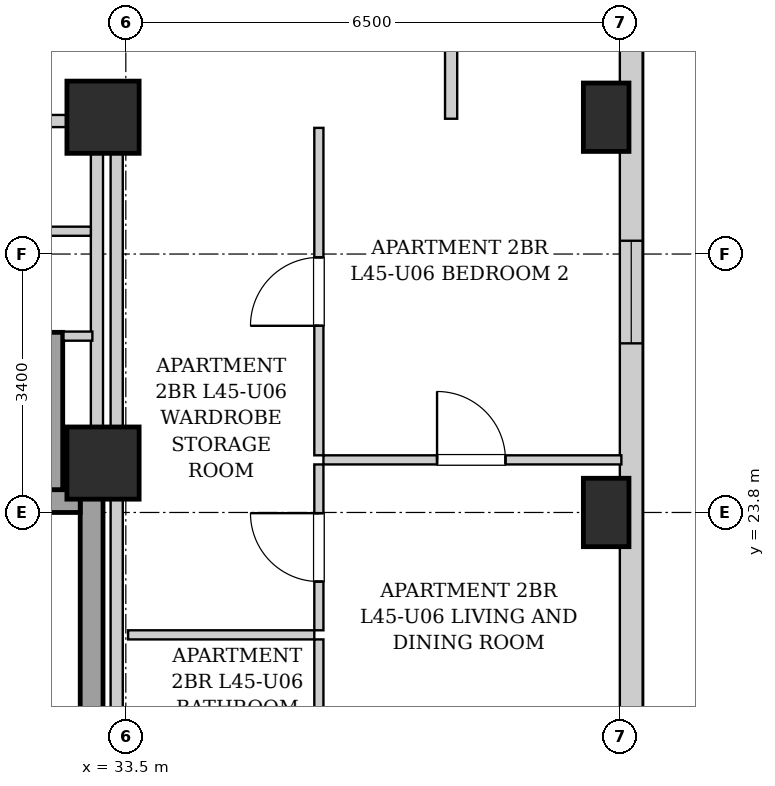
"""IFC4 building model, lengths in metres.
Left out: names, types, materials, properties, quantities, classifications, styles, units other than length and angle.
Written with IfcOpenShell. Run it as: python <this file> out.ifc"""

import sys

from ifc_helpers import new_model, si_unit, direction, frame, frame_2d, origin, origin_2d, place, context, subcontext, project, spatial, rectangle, extrude, element, fill, save


model = new_model("IFC4")
c1 = context("Model", 3, precision=1e-05, world=origin(), true_north=direction((0.0, 1.0)))
c2 = subcontext(c1, "Body", "Model", "MODEL_VIEW")
j1 = project(units=[si_unit("LENGTHUNIT", "METRE"), si_unit("PLANEANGLEUNIT", "RADIAN")], contexts=[c1])
p1 = place(None, origin())
s1 = spatial("IfcSite", under=j1, at=p1, CompositionType="ELEMENT")
p2 = place(p1, origin())
s2 = spatial("IfcBuilding", under=s1, at=p2, CompositionType="ELEMENT")
p3 = place(p2, frame((0.0, 0.0, 156.9)))
s3 = spatial("IfcBuildingStorey", under=s2, at=p3, CompositionType="ELEMENT", Elevation=156.9)
for number, where, z_axis, x_axis in (
    (1, (39.82, 23.8, 0.0), (0.0, 0.0, 1.0), (1.0, 0.0, 0.0)),
    (2, (39.82, 29.0, 0.0), (0.0, 0.0, 1.0), (1.0, 0.0, 0.0)),
):
    element("IfcColumn", number, at=place(p3, frame(where, z_axis=z_axis, x_axis=x_axis)), inside=s3, PredefinedType="COLUMN", context=c2, shape_type="SweptSolid", body=[
        extrude(rectangle(XDim=0.6, YDim=0.9, at=origin_2d()), origin(), (0.0, 0.0, 1.0), 3.25),
    ])
for number, where, z_axis, x_axis in (
    (3, (33.2, 29.0, 0.0), (0.0, 0.0, 1.0), (1.0, 0.0, 0.0)),
    (4, (33.2, 24.45, 0.0), (0.0, 0.0, 1.0), (1.0, 0.0, 0.0)),
):
    element("IfcColumn", number, at=place(p3, frame(where, z_axis=z_axis, x_axis=x_axis)), inside=s3, PredefinedType="COLUMN", context=c2, shape_type="SweptSolid", body=[
        extrude(rectangle(XDim=0.95, YDim=0.95, at=origin_2d()), origin(), (0.0, 0.0, 1.0), 3.25),
    ])
p4 = place(p3, frame((40.15, 40.8, 0.0), z_axis=(0.0, 0.0, 1.0), x_axis=(0.0, -1.0, 0.0)))
e5 = element("IfcWall", 5, at=p4, inside=s3, PredefinedType="SOLIDWALL", context=c2, shape_type="SweptSolid", body=[
    extrude(rectangle(XDim=34.5, YDim=0.3, at=frame_2d((17.25, 0.0))), origin(), (0.0, 0.0, 1.0), 2.99),
])
p5 = place(p4, frame((31.575, 0.0, 0.55)))
e6 = element("IfcOpeningElement", 6, at=p5, cuts=e5, PredefinedType="OPENING", context=c2, shape_type="SweptSolid", body=[
    extrude(rectangle(XDim=1.35, YDim=1.2, at=frame_2d((0.675, 0.6))), frame((0.0, 0.16, 0.0), z_axis=(0.0, -1.0, 0.0), x_axis=(1.0, 0.0, 0.0)), (0.0, 0.0, 1.0), 0.32),
])
p6 = place(p4, frame((3.075, 0.0, 0.55)))
e7 = element("IfcOpeningElement", 7, at=p6, cuts=e5, PredefinedType="OPENING", context=c2, shape_type="SweptSolid", body=[
    extrude(rectangle(XDim=1.35, YDim=1.2, at=frame_2d((0.675, 0.6))), frame((0.0, 0.16, 0.0), z_axis=(0.0, -1.0, 0.0), x_axis=(1.0, 0.0, 0.0)), (0.0, 0.0, 1.0), 0.32),
])
p7 = place(p4, frame((1.085, 0.0, 0.55)))
e8 = element("IfcOpeningElement", 8, at=p7, cuts=e5, PredefinedType="OPENING", context=c2, shape_type="SweptSolid", body=[
    extrude(rectangle(XDim=1.35, YDim=1.2, at=frame_2d((0.675, 0.6))), frame((0.0, 0.16, 0.0), z_axis=(0.0, -1.0, 0.0), x_axis=(1.0, 0.0, 0.0)), (0.0, 0.0, 1.0), 0.32),
])
p8 = place(p4, frame((22.8, 0.0, 0.55)))
e9 = element("IfcOpeningElement", 9, at=p8, cuts=e5, PredefinedType="OPENING", context=c2, shape_type="SweptSolid", body=[
    extrude(rectangle(XDim=1.35, YDim=1.2, at=frame_2d((0.675, 0.6))), frame((0.0, 0.16, 0.0), z_axis=(0.0, -1.0, 0.0), x_axis=(1.0, 0.0, 0.0)), (0.0, 0.0, 1.0), 0.32),
])
p9 = place(p4, frame((13.425, 0.0, 0.55)))
e10 = element("IfcOpeningElement", 10, at=p9, cuts=e5, PredefinedType="OPENING", context=c2, shape_type="SweptSolid", body=[
    extrude(rectangle(XDim=1.35, YDim=1.2, at=frame_2d((0.675, 0.6))), frame((0.0, 0.16, 0.0), z_axis=(0.0, -1.0, 0.0), x_axis=(1.0, 0.0, 0.0)), (0.0, 0.0, 1.0), 0.32),
])
p10 = place(p3, frame((33.05, 15.1, 0.0), z_axis=(0.0, 0.0, 1.0), x_axis=(0.0, 1.0, 0.0)))
e11 = element("IfcWall", 11, at=p10, inside=s3, PredefinedType="SHEAR", context=c2, shape_type="SweptSolid", body=[
    extrude(rectangle(XDim=9.0, YDim=0.3, at=frame_2d((4.5, 0.0))), origin(), (0.0, 0.0, 1.0), 2.99),
])
p11 = place(p3, frame((30.05, 23.95, 0.0), z_axis=(0.0, 0.0, 1.0), x_axis=(1.0, 0.0, 0.0)))
e12 = element("IfcWall", 12, at=p11, inside=s3, PredefinedType="SHEAR", context=c2, shape_type="SweptSolid", body=[
    extrude(rectangle(XDim=2.85, YDim=0.3, at=frame_2d((1.425, 0.0))), origin(), (0.0, 0.0, 1.0), 2.99),
])
p12 = place(p3, frame((32.56, 24.1, 0.0), z_axis=(0.0, 0.0, 1.0), x_axis=(0.0, 1.0, 0.0)))
e13 = element("IfcWall", 13, at=p12, inside=s3, PredefinedType="SHEAR", context=c2, shape_type="SweptSolid", body=[
    extrude(rectangle(XDim=2.07, YDim=0.22, at=frame_2d((1.035, 0.0))), origin(), (0.0, 0.0, 1.0), 2.99),
])
p13 = place(p3, frame((33.12, 24.12, 0.0), z_axis=(0.0, 0.0, 1.0), x_axis=(0.0, 1.0, 0.0)))
e14 = element("IfcWall", 14, at=p13, inside=s3, PredefinedType="PARTITIONING", context=c2, shape_type="SweptSolid", body=[
    extrude(rectangle(XDim=4.76, YDim=0.16, at=frame_2d((2.38, 0.0))), origin(), (0.0, 0.0, 1.0), 2.325),
])
p14 = place(p3, frame((32.68, 26.12, 0.0), z_axis=(0.0, 0.0, 1.0), x_axis=(1.0, 0.0, 0.0)))
e15 = element("IfcWall", 15, at=p14, inside=s3, PredefinedType="PARTITIONING", context=c2, shape_type="SweptSolid", body=[
    extrude(rectangle(XDim=0.38, YDim=0.12, at=frame_2d((0.19, 0.0))), origin(), (0.0, 0.0, 1.0), 2.99),
])
p15 = place(p3, frame((30.12, 27.5, 0.0), z_axis=(0.0, 0.0, 1.0), x_axis=(1.0, 0.0, 0.0)))
e16 = element("IfcWall", 16, at=p15, inside=s3, PredefinedType="PARTITIONING", context=c2, shape_type="SweptSolid", body=[
    extrude(rectangle(XDim=2.92, YDim=0.12, at=frame_2d((1.46, 0.0))), origin(), (0.0, 0.0, 1.0), 2.99),
])
p16 = place(p15, frame((0.97, 0.0, 0.0)))
e17 = element("IfcOpeningElement", 17, at=p16, cuts=e16, PredefinedType="OPENING", context=c2, shape_type="SweptSolid", body=[
    extrude(rectangle(XDim=0.86, YDim=2.05, at=frame_2d((0.43, 1.025))), frame((0.0, 0.07, 0.0), z_axis=(0.0, -1.0, 0.0), x_axis=(1.0, 0.0, 0.0)), (0.0, 0.0, 1.0), 0.14),
])
p17 = place(p3, frame((25.72, 28.95, 0.0), z_axis=(0.0, 0.0, 1.0), x_axis=(1.0, 0.0, 0.0)))
e18 = element("IfcWall", 18, at=p17, inside=s3, PredefinedType="PARTITIONING", context=c2, shape_type="SweptSolid", body=[
    extrude(rectangle(XDim=7.32, YDim=0.16, at=frame_2d((3.66, 0.0))), origin(), (0.0, 0.0, 1.0), 2.442),
])
p18 = place(p17, frame((1.27, 0.0, 0.0)))
e19 = element("IfcOpeningElement", 19, at=p18, cuts=e18, PredefinedType="OPENING", context=c2, shape_type="SweptSolid", body=[
    extrude(rectangle(XDim=0.86, YDim=2.05, at=frame_2d((0.43, 1.025))), frame((0.0, 0.09, 0.0), z_axis=(0.0, -1.0, 0.0), x_axis=(1.0, 0.0, 0.0)), (0.0, 0.0, 1.0), 0.18),
])
p19 = place(p3, frame((37.78, 28.98, 0.0), z_axis=(0.0, 0.0, 1.0), x_axis=(0.0, 1.0, 0.0)))
e20 = element("IfcWall", 20, at=p19, inside=s3, PredefinedType="PARTITIONING", context=c2, shape_type="SweptSolid", body=[
    extrude(rectangle(XDim=1.74, YDim=0.16, at=frame_2d((0.87, 0.0))), origin(), (0.0, 0.0, 1.0), 2.99),
])
p20 = place(p3, frame((33.53, 22.19, 0.0), z_axis=(0.0, 0.0, 1.0), x_axis=(1.0, 0.0, 0.0)))
e21 = element("IfcWall", 21, at=p20, inside=s3, PredefinedType="PARTITIONING", context=c2, shape_type="SweptSolid", body=[
    extrude(rectangle(XDim=2.45, YDim=0.12, at=frame_2d((1.225, 0.0))), origin(), (0.0, 0.0, 1.0), 2.99),
])
p21 = place(p3, frame((36.04, 22.25, 0.0), z_axis=(0.0, 0.0, 1.0), x_axis=(0.0, 1.0, 0.0)))
e22 = element("IfcWall", 22, at=p21, inside=s3, PredefinedType="PARTITIONING", context=c2, shape_type="SweptSolid", body=[
    extrude(rectangle(XDim=2.182, YDim=0.12, at=frame_2d((1.091, 0.0))), origin(), (0.0, 0.0, 1.0), 2.99),
])
p22 = place(p21, frame((0.641, 0.0, 0.0)))
e23 = element("IfcOpeningElement", 23, at=p22, cuts=e22, PredefinedType="OPENING", context=c2, shape_type="SweptSolid", body=[
    extrude(rectangle(XDim=0.9, YDim=2.05, at=frame_2d((0.45, 1.025))), frame((0.0, 0.07, 0.0), z_axis=(0.0, -1.0, 0.0), x_axis=(1.0, 0.0, 0.0)), (0.0, 0.0, 1.0), 0.14),
])
p23 = place(p3, frame((36.04, 24.552, 0.0), z_axis=(0.0, 0.0, 1.0), x_axis=(0.0, 1.0, 0.0)))
e24 = element("IfcWall", 24, at=p23, inside=s3, PredefinedType="PARTITIONING", context=c2, shape_type="SweptSolid", body=[
    extrude(rectangle(XDim=4.308, YDim=0.12, at=frame_2d((2.154, 0.0))), origin(), (0.0, 0.0, 1.0), 2.99),
])
p24 = place(p23, frame((1.704, 0.0, 0.0)))
e25 = element("IfcOpeningElement", 25, at=p24, cuts=e24, PredefinedType="OPENING", context=c2, shape_type="SweptSolid", body=[
    extrude(rectangle(XDim=0.9, YDim=2.05, at=frame_2d((0.45, 1.025))), frame((0.0, 0.07, 0.0), z_axis=(0.0, -1.0, 0.0), x_axis=(1.0, 0.0, 0.0)), (0.0, 0.0, 1.0), 0.14),
])
p25 = place(p3, frame((36.04, 19.83, 0.0), z_axis=(0.0, 0.0, 1.0), x_axis=(0.0, 1.0, 0.0)))
e26 = element("IfcWall", 26, at=p25, inside=s3, PredefinedType="PARTITIONING", context=c2, shape_type="SweptSolid", body=[
    extrude(rectangle(XDim=2.3, YDim=0.12, at=frame_2d((1.15, 0.0))), origin(), (0.0, 0.0, 1.0), 2.99),
])
p26 = place(p3, frame((36.1, 24.492, 0.0), z_axis=(0.0, 0.0, 1.0), x_axis=(1.0, 0.0, 0.0)))
e27 = element("IfcWall", 27, at=p26, inside=s3, PredefinedType="PARTITIONING", context=c2, shape_type="SweptSolid", body=[
    extrude(rectangle(XDim=3.92, YDim=0.12, at=frame_2d((1.96, 0.0))), origin(), (0.0, 0.0, 1.0), 2.621),
])
p27 = place(p26, frame((1.495, 0.0, 0.0)))
e28 = element("IfcOpeningElement", 28, at=p27, cuts=e27, PredefinedType="OPENING", context=c2, shape_type="SweptSolid", body=[
    extrude(rectangle(XDim=0.9, YDim=2.05, at=frame_2d((0.45, 1.025))), frame((0.0, 0.07, 0.0), z_axis=(0.0, -1.0, 0.0), x_axis=(1.0, 0.0, 0.0)), (0.0, 0.0, 1.0), 0.14),
])
p28 = place(p3, frame((33.38, 15.02, 0.0), z_axis=(0.0, 0.0, 1.0), x_axis=(0.0, 1.0, 0.0)))
e29 = element("IfcWall", 29, at=p28, inside=s3, PredefinedType="PARTITIONING", context=c2, shape_type="SweptSolid", body=[
    extrude(rectangle(XDim=13.98, YDim=0.16, at=frame_2d((6.99, 0.0))), origin(), (0.0, 0.0, 1.0), 2.325),
])
p29 = place(p22, origin())
e30 = element("IfcDoor", 30, at=p29, inside=s3, OperationType="SINGLE_SWING_RIGHT", PredefinedType="DOOR", context=c2, shape_type="SweptSolid", body=[
    extrude(rectangle(XDim=0.9, YDim=2.05, at=frame_2d((0.45, 1.025))), frame((0.0, 0.025, 0.0), z_axis=(0.0, -1.0, 0.0), x_axis=(1.0, 0.0, 0.0)), (0.0, 0.0, 1.0), 0.05),
])
fill(e23, e30)
p30 = place(p24, origin())
e31 = element("IfcDoor", 31, at=p30, inside=s3, OperationType="SINGLE_SWING_LEFT", PredefinedType="DOOR", context=c2, shape_type="SweptSolid", body=[
    extrude(rectangle(XDim=0.9, YDim=2.05, at=frame_2d((0.45, 1.025))), frame((0.0, 0.025, 0.0), z_axis=(0.0, -1.0, 0.0), x_axis=(1.0, 0.0, 0.0)), (0.0, 0.0, 1.0), 0.05),
])
fill(e25, e31)
p31 = place(p27, origin())
e32 = element("IfcDoor", 32, at=p31, inside=s3, OperationType="SINGLE_SWING_LEFT", PredefinedType="DOOR", context=c2, shape_type="SweptSolid", body=[
    extrude(rectangle(XDim=0.9, YDim=2.05, at=frame_2d((0.45, 1.025))), frame((0.0, 0.025, 0.0), z_axis=(0.0, -1.0, 0.0), x_axis=(1.0, 0.0, 0.0)), (0.0, 0.0, 1.0), 0.05),
])
fill(e28, e32)
p32 = place(p9, origin())
e33 = element("IfcWindow", 33, at=p32, inside=s3, PartitioningType="SINGLE_PANEL", PredefinedType="WINDOW", context=c2, shape_type="SweptSolid", body=[
    extrude(rectangle(XDim=1.35, YDim=1.2, at=frame_2d((0.675, 0.6))), frame((0.0, 0.03, 0.0), z_axis=(0.0, -1.0, 0.0), x_axis=(1.0, 0.0, 0.0)), (0.0, 0.0, 1.0), 0.06),
])
fill(e10, e33)
save(model, sys.argv[1])
